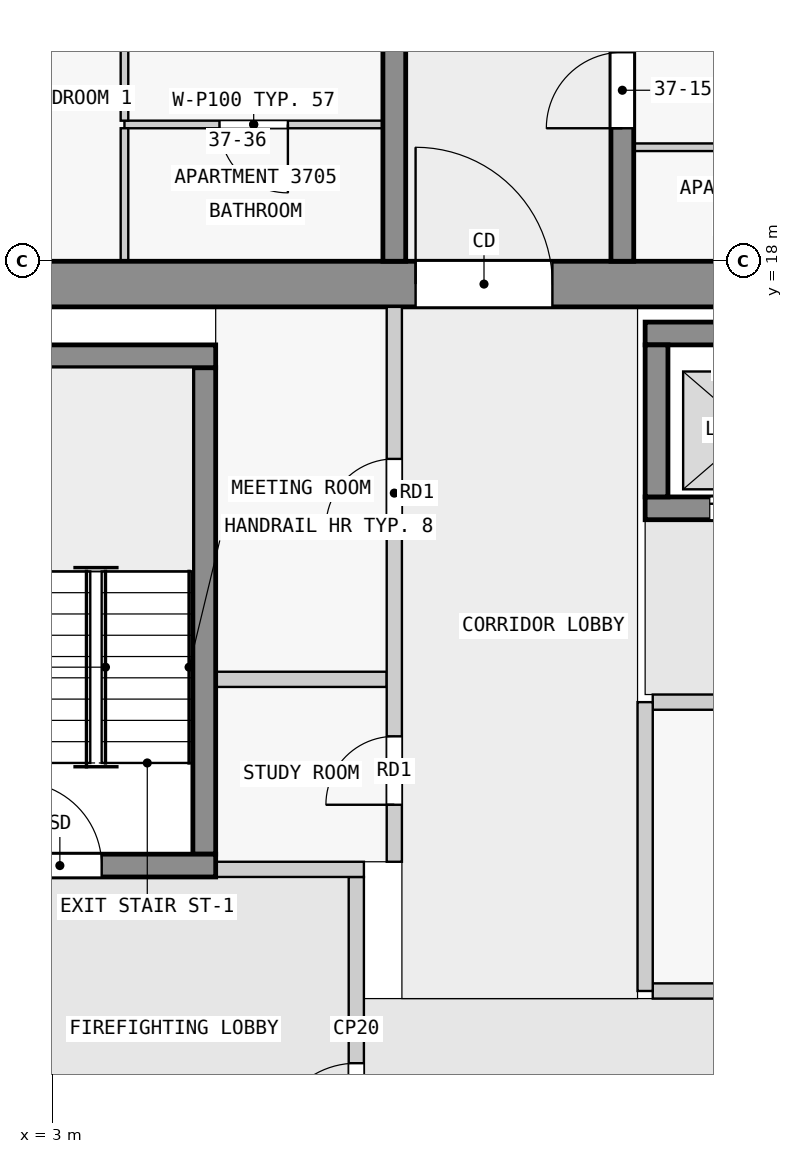
"""IFC4 building model, lengths in metres.
Left out: names, types, materials, properties, quantities, classifications, styles, units other than length and angle.
Written with IfcOpenShell. Run it as: python <this file> out.ifc"""

import sys

from ifc_helpers import new_model, si_unit, direction, frame, frame_2d, origin, place, context, subcontext, project, spatial, rectangle, extrude, element, fill, save


model = new_model("IFC4")
c1 = context("Model", 3, precision=1e-05, world=origin(), true_north=direction((0.0, 1.0)))
c2 = subcontext(c1, "Body", "Model", "MODEL_VIEW")
j1 = project(units=[si_unit("LENGTHUNIT", "METRE"), si_unit("PLANEANGLEUNIT", "RADIAN")], contexts=[c1])
p1 = place(None, origin())
s1 = spatial("IfcSite", under=j1, at=p1, CompositionType="ELEMENT")
p2 = place(p1, origin())
s2 = spatial("IfcBuilding", under=s1, at=p2, CompositionType="ELEMENT")
p3 = place(p2, frame((0.0, 0.0, 146.4)))
s3 = spatial("IfcBuildingStorey", under=s2, at=p3, CompositionType="ELEMENT", Elevation=146.4)
p4 = place(p3, frame((1.38, 17.7, 0.0), z_axis=(0.0, 0.0, 1.0), x_axis=(1.0, 0.0, 0.0)))
e1 = element("IfcWall", 1, at=p4, inside=s3, PredefinedType="SHEAR", context=c2, shape_type="SweptSolid", body=[
    extrude(rectangle(XDim=21.12, YDim=0.6, at=frame_2d((10.56, 0.0))), origin(), (0.0, 0.0, 1.0), 3.25),
])
p5 = place(p4, frame((6.4, 0.0, 0.0)))
e2 = element("IfcOpeningElement", 2, at=p5, cuts=e1, PredefinedType="OPENING", context=c2, shape_type="SweptSolid", body=[
    extrude(rectangle(XDim=1.8, YDim=2.1, at=frame_2d((0.9, 1.05))), frame((0.0, 0.31, 0.0), z_axis=(0.0, -1.0, 0.0), x_axis=(1.0, 0.0, 0.0)), (0.0, 0.0, 1.0), 0.62),
])
p6 = place(p3, frame((2.3, 10.05, 0.0), z_axis=(0.0, 0.0, 1.0), x_axis=(1.0, 0.0, 0.0)))
e3 = element("IfcWall", 3, at=p6, inside=s3, PredefinedType="SHEAR", context=c2, shape_type="SweptSolid", body=[
    extrude(rectangle(XDim=2.85, YDim=0.3, at=frame_2d((1.425, 0.0))), origin(), (0.0, 0.0, 1.0), 3.25),
])
p7 = place(p6, frame((0.25, 0.0, 0.0)))
e4 = element("IfcOpeningElement", 4, at=p7, cuts=e3, PredefinedType="OPENING", context=c2, shape_type="SweptSolid", body=[
    extrude(rectangle(XDim=1.1, YDim=2.1, at=frame_2d((0.55, 1.05))), frame((0.0, 0.16, 0.0), z_axis=(0.0, -1.0, 0.0), x_axis=(1.0, 0.0, 0.0)), (0.0, 0.0, 1.0), 0.32),
])
p8 = place(p3, frame((5.0, 10.2, 0.0), z_axis=(0.0, 0.0, 1.0), x_axis=(0.0, 1.0, 0.0)))
e5 = element("IfcWall", 5, at=p8, inside=s3, PredefinedType="SHEAR", context=c2, shape_type="SweptSolid", body=[
    extrude(rectangle(XDim=6.4, YDim=0.3, at=frame_2d((3.2, 0.0))), origin(), (0.0, 0.0, 1.0), 3.25),
])
p9 = place(p3, frame((2.3, 16.75, 0.0), z_axis=(0.0, 0.0, 1.0), x_axis=(1.0, 0.0, 0.0)))
e6 = element("IfcWall", 6, at=p9, inside=s3, PredefinedType="SHEAR", context=c2, shape_type="SweptSolid", body=[
    extrude(rectangle(XDim=2.85, YDim=0.3, at=frame_2d((1.425, 0.0))), origin(), (0.0, 0.0, 1.0), 3.25),
])
p10 = place(p3, frame((10.8, 17.05, 0.0), z_axis=(0.0, 0.0, 1.0), x_axis=(1.0, 0.0, 0.0)))
e7 = element("IfcWall", 7, at=p10, inside=s3, PredefinedType="SHEAR", context=c2, shape_type="SweptSolid", body=[
    extrude(rectangle(XDim=7.8, YDim=0.3, at=frame_2d((3.9, 0.0))), origin(), (0.0, 0.0, 1.0), 3.25),
])
p11 = place(p3, frame((10.8, 14.75, 0.0), z_axis=(0.0, 0.0, 1.0), x_axis=(1.0, 0.0, 0.0)))
e8 = element("IfcWall", 8, at=p11, inside=s3, PredefinedType="SHEAR", context=c2, shape_type="SweptSolid", body=[
    extrude(rectangle(XDim=7.8, YDim=0.3, at=frame_2d((3.9, 0.0))), origin(), (0.0, 0.0, 1.0), 3.25),
])
p12 = place(p11, frame((0.85, 0.0, 0.0)))
e9 = element("IfcOpeningElement", 9, at=p12, cuts=e8, PredefinedType="OPENING", context=c2, shape_type="SweptSolid", body=[
    extrude(rectangle(XDim=1.1, YDim=2.1, at=frame_2d((0.55, 1.05))), frame((0.0, 0.16, 0.0), z_axis=(0.0, -1.0, 0.0), x_axis=(1.0, 0.0, 0.0)), (0.0, 0.0, 1.0), 0.32),
])
p13 = place(p11, frame((3.35, 0.0, 0.0)))
e10 = element("IfcOpeningElement", 10, at=p13, cuts=e8, PredefinedType="OPENING", context=c2, shape_type="SweptSolid", body=[
    extrude(rectangle(XDim=1.1, YDim=2.1, at=frame_2d((0.55, 1.05))), frame((0.0, 0.16, 0.0), z_axis=(0.0, -1.0, 0.0), x_axis=(1.0, 0.0, 0.0)), (0.0, 0.0, 1.0), 0.32),
])
p14 = place(p11, frame((5.85, 0.0, 0.0)))
e11 = element("IfcOpeningElement", 11, at=p14, cuts=e8, PredefinedType="OPENING", context=c2, shape_type="SweptSolid", body=[
    extrude(rectangle(XDim=1.1, YDim=2.1, at=frame_2d((0.55, 1.05))), frame((0.0, 0.16, 0.0), z_axis=(0.0, -1.0, 0.0), x_axis=(1.0, 0.0, 0.0)), (0.0, 0.0, 1.0), 0.32),
])
p15 = place(p3, frame((10.95, 14.9, 0.0), z_axis=(0.0, 0.0, 1.0), x_axis=(0.0, 1.0, 0.0)))
e12 = element("IfcWall", 12, at=p15, inside=s3, PredefinedType="SHEAR", context=c2, shape_type="SweptSolid", body=[
    extrude(rectangle(XDim=2.0, YDim=0.3, at=frame_2d((1.0, 0.0))), origin(), (0.0, 0.0, 1.0), 3.25),
])
p16 = place(p3, frame((7.5, 18.0, 0.0), z_axis=(0.0, 0.0, 1.0), x_axis=(0.0, 1.0, 0.0)))
e13 = element("IfcWall", 13, at=p16, inside=s3, PredefinedType="SHEAR", context=c2, shape_type="SweptSolid", body=[
    extrude(rectangle(XDim=27.0, YDim=0.3, at=frame_2d((13.5, 0.0))), origin(), (0.0, 0.0, 1.0), 3.25),
])
p17 = place(p16, frame((4.05, 0.0, 0.0)))
e14 = element("IfcOpeningElement", 14, at=p17, cuts=e13, PredefinedType="OPENING", context=c2, shape_type="SweptSolid", body=[
    extrude(rectangle(XDim=1.0, YDim=2.1, at=frame_2d((0.5, 1.05))), frame((0.0, 0.16, 0.0), z_axis=(0.0, -1.0, 0.0), x_axis=(1.0, 0.0, 0.0)), (0.0, 0.0, 1.0), 0.32),
])
p18 = place(p16, frame((10.75, 0.0, 0.0)))
e15 = element("IfcOpeningElement", 15, at=p18, cuts=e13, PredefinedType="OPENING", context=c2, shape_type="SweptSolid", body=[
    extrude(rectangle(XDim=1.0, YDim=2.1, at=frame_2d((0.5, 1.05))), frame((0.0, 0.16, 0.0), z_axis=(0.0, -1.0, 0.0), x_axis=(1.0, 0.0, 0.0)), (0.0, 0.0, 1.0), 0.32),
])
p19 = place(p16, frame((17.55, 0.0, 0.0)))
e16 = element("IfcOpeningElement", 16, at=p19, cuts=e13, PredefinedType="OPENING", context=c2, shape_type="SweptSolid", body=[
    extrude(rectangle(XDim=1.0, YDim=2.1, at=frame_2d((0.5, 1.05))), frame((0.0, 0.16, 0.0), z_axis=(0.0, -1.0, 0.0), x_axis=(1.0, 0.0, 0.0)), (0.0, 0.0, 1.0), 0.32),
])
p20 = place(p16, frame((23.25, 0.0, 0.0)))
e17 = element("IfcOpeningElement", 17, at=p20, cuts=e13, PredefinedType="OPENING", context=c2, shape_type="SweptSolid", body=[
    extrude(rectangle(XDim=0.9, YDim=2.1, at=frame_2d((0.45, 1.05))), frame((0.0, 0.16, 0.0), z_axis=(0.0, -1.0, 0.0), x_axis=(1.0, 0.0, 0.0)), (0.0, 0.0, 1.0), 0.32),
])
p21 = place(p16, frame((25.45, 0.0, 0.0)))
e18 = element("IfcOpeningElement", 18, at=p21, cuts=e13, PredefinedType="OPENING", context=c2, shape_type="SweptSolid", body=[
    extrude(rectangle(XDim=1.0, YDim=2.1, at=frame_2d((0.5, 1.05))), frame((0.0, 0.16, 0.0), z_axis=(0.0, -1.0, 0.0), x_axis=(1.0, 0.0, 0.0)), (0.0, 0.0, 1.0), 0.32),
])
p22 = place(p3, frame((10.5, 18.0, 0.0), z_axis=(0.0, 0.0, 1.0), x_axis=(0.0, 1.0, 0.0)))
e19 = element("IfcWall", 19, at=p22, inside=s3, PredefinedType="SHEAR", context=c2, shape_type="SweptSolid", body=[
    extrude(rectangle(XDim=27.0, YDim=0.3, at=frame_2d((13.5, 0.0))), origin(), (0.0, 0.0, 1.0), 3.25),
])
p23 = place(p22, frame((1.75, 0.0, 0.0)))
e20 = element("IfcOpeningElement", 20, at=p23, cuts=e19, PredefinedType="OPENING", context=c2, shape_type="SweptSolid", body=[
    extrude(rectangle(XDim=1.0, YDim=2.1, at=frame_2d((0.5, 1.05))), frame((0.0, 0.16, 0.0), z_axis=(0.0, -1.0, 0.0), x_axis=(1.0, 0.0, 0.0)), (0.0, 0.0, 1.0), 0.32),
])
p24 = place(p22, frame((6.25, 0.0, 0.0)))
e21 = element("IfcOpeningElement", 21, at=p24, cuts=e19, PredefinedType="OPENING", context=c2, shape_type="SweptSolid", body=[
    extrude(rectangle(XDim=1.0, YDim=2.1, at=frame_2d((0.5, 1.05))), frame((0.0, 0.16, 0.0), z_axis=(0.0, -1.0, 0.0), x_axis=(1.0, 0.0, 0.0)), (0.0, 0.0, 1.0), 0.32),
])
p25 = place(p22, frame((10.35, 0.0, 0.0)))
e22 = element("IfcOpeningElement", 22, at=p25, cuts=e19, PredefinedType="OPENING", context=c2, shape_type="SweptSolid", body=[
    extrude(rectangle(XDim=1.8, YDim=2.1, at=frame_2d((0.9, 1.05))), frame((0.0, 0.16, 0.0), z_axis=(0.0, -1.0, 0.0), x_axis=(1.0, 0.0, 0.0)), (0.0, 0.0, 1.0), 0.32),
])
p26 = place(p22, frame((15.25, 0.0, 0.0)))
e23 = element("IfcOpeningElement", 23, at=p26, cuts=e19, PredefinedType="OPENING", context=c2, shape_type="SweptSolid", body=[
    extrude(rectangle(XDim=1.0, YDim=2.1, at=frame_2d((0.5, 1.05))), frame((0.0, 0.16, 0.0), z_axis=(0.0, -1.0, 0.0), x_axis=(1.0, 0.0, 0.0)), (0.0, 0.0, 1.0), 0.32),
])
p27 = place(p22, frame((21.35, 0.0, 0.0)))
e24 = element("IfcOpeningElement", 24, at=p27, cuts=e19, PredefinedType="OPENING", context=c2, shape_type="SweptSolid", body=[
    extrude(rectangle(XDim=1.0, YDim=2.1, at=frame_2d((0.5, 1.05))), frame((0.0, 0.16, 0.0), z_axis=(0.0, -1.0, 0.0), x_axis=(1.0, 0.0, 0.0)), (0.0, 0.0, 1.0), 0.32),
])
p28 = place(p3, frame((7.0, 5.9, 0.0), z_axis=(0.0, 0.0, 1.0), x_axis=(0.0, 1.0, 0.0)))
e25 = element("IfcWall", 25, at=p28, inside=s3, PredefinedType="PARTITIONING", context=c2, shape_type="SweptSolid", body=[
    extrude(rectangle(XDim=4.0, YDim=0.2, at=frame_2d((2.0, 0.0))), origin(), (0.0, 0.0, 1.0), 3.25),
])
p29 = place(p28, frame((0.45, 0.0, 0.0)))
e26 = element("IfcOpeningElement", 26, at=p29, cuts=e25, PredefinedType="OPENING", context=c2, shape_type="SweptSolid", body=[
    extrude(rectangle(XDim=1.1, YDim=2.1, at=frame_2d((0.55, 1.05))), frame((0.0, 0.11, 0.0), z_axis=(0.0, -1.0, 0.0), x_axis=(1.0, 0.0, 0.0)), (0.0, 0.0, 1.0), 0.22),
])
p30 = place(p3, frame((5.15, 10.0, 0.0), z_axis=(0.0, 0.0, 1.0), x_axis=(1.0, 0.0, 0.0)))
e27 = element("IfcWall", 27, at=p30, inside=s3, PredefinedType="PARTITIONING", context=c2, shape_type="SweptSolid", body=[
    extrude(rectangle(XDim=1.95, YDim=0.2, at=frame_2d((0.975, 0.0))), origin(), (0.0, 0.0, 1.0), 3.25),
])
p31 = place(p3, frame((10.8, 8.4, 0.0), z_axis=(0.0, 0.0, 1.0), x_axis=(0.0, 1.0, 0.0)))
e28 = element("IfcWall", 28, at=p31, inside=s3, PredefinedType="PARTITIONING", context=c2, shape_type="SweptSolid", body=[
    extrude(rectangle(XDim=3.8, YDim=0.2, at=frame_2d((1.9, 0.0))), origin(), (0.0, 0.0, 1.0), 3.25),
])
p32 = place(p3, frame((10.9, 8.4, 0.0), z_axis=(0.0, 0.0, 1.0), x_axis=(1.0, 0.0, 0.0)))
e29 = element("IfcWall", 29, at=p32, inside=s3, PredefinedType="PARTITIONING", context=c2, shape_type="SweptSolid", body=[
    extrude(rectangle(XDim=8.5, YDim=0.2, at=frame_2d((4.25, 0.0))), origin(), (0.0, 0.0, 1.0), 3.25),
])
p33 = place(p3, frame((10.9, 12.2, 0.0), z_axis=(0.0, 0.0, 1.0), x_axis=(1.0, 0.0, 0.0)))
e30 = element("IfcWall", 30, at=p33, inside=s3, PredefinedType="PARTITIONING", context=c2, shape_type="SweptSolid", body=[
    extrude(rectangle(XDim=8.5, YDim=0.2, at=frame_2d((4.25, 0.0))), origin(), (0.0, 0.0, 1.0), 3.25),
])
p34 = place(p33, frame((3.8, 0.0, 0.0)))
e31 = element("IfcOpeningElement", 31, at=p34, cuts=e30, PredefinedType="OPENING", context=c2, shape_type="SweptSolid", body=[
    extrude(rectangle(XDim=0.9, YDim=2.1, at=frame_2d((0.45, 1.05))), frame((0.0, 0.11, 0.0), z_axis=(0.0, -1.0, 0.0), x_axis=(1.0, 0.0, 0.0)), (0.0, 0.0, 1.0), 0.22),
])
p35 = place(p3, frame((7.5, 10.1, 0.0), z_axis=(0.0, 0.0, 1.0), x_axis=(0.0, 1.0, 0.0)))
e32 = element("IfcWall", 32, at=p35, inside=s3, PredefinedType="PARTITIONING", context=c2, shape_type="SweptSolid", body=[
    extrude(rectangle(XDim=7.3, YDim=0.2, at=frame_2d((3.65, 0.0))), origin(), (0.0, 0.0, 1.0), 3.25),
])
p36 = place(p35, frame((0.75, 0.0, 0.0)))
e33 = element("IfcOpeningElement", 33, at=p36, cuts=e32, PredefinedType="OPENING", context=c2, shape_type="SweptSolid", body=[
    extrude(rectangle(XDim=0.9, YDim=2.1, at=frame_2d((0.45, 1.05))), frame((0.0, 0.11, 0.0), z_axis=(0.0, -1.0, 0.0), x_axis=(1.0, 0.0, 0.0)), (0.0, 0.0, 1.0), 0.22),
])
p37 = place(p35, frame((4.4, 0.0, 0.0)))
e34 = element("IfcOpeningElement", 34, at=p37, cuts=e32, PredefinedType="OPENING", context=c2, shape_type="SweptSolid", body=[
    extrude(rectangle(XDim=0.9, YDim=2.1, at=frame_2d((0.45, 1.05))), frame((0.0, 0.11, 0.0), z_axis=(0.0, -1.0, 0.0), x_axis=(1.0, 0.0, 0.0)), (0.0, 0.0, 1.0), 0.22),
])
p38 = place(p3, frame((5.15, 12.5, 0.0), z_axis=(0.0, 0.0, 1.0), x_axis=(1.0, 0.0, 0.0)))
e35 = element("IfcWall", 35, at=p38, inside=s3, PredefinedType="PARTITIONING", context=c2, shape_type="SweptSolid", body=[
    extrude(rectangle(XDim=2.25, YDim=0.2, at=frame_2d((1.125, 0.0))), origin(), (0.0, 0.0, 1.0), 3.25),
])
p39 = place(p3, frame((14.05, 19.5, 0.0), z_axis=(0.0, 0.0, 1.0), x_axis=(-1.0, 0.0, 0.0)))
e36 = element("IfcWall", 36, at=p39, inside=s3, PredefinedType="PARTITIONING", context=c2, shape_type="SweptSolid", body=[
    extrude(rectangle(XDim=3.4, YDim=0.1, at=frame_2d((1.7, 0.0))), origin(), (0.0, 0.0, 1.0), 3.25),
])
p40 = place(p39, frame((1.25, 0.0, 0.0)))
e37 = element("IfcOpeningElement", 37, at=p40, cuts=e36, PredefinedType="OPENING", context=c2, shape_type="SweptSolid", body=[
    extrude(rectangle(XDim=0.9, YDim=2.1, at=frame_2d((0.45, 1.05))), frame((0.0, 0.06, 0.0), z_axis=(0.0, -1.0, 0.0), x_axis=(1.0, 0.0, 0.0)), (0.0, 0.0, 1.0), 0.12),
])
p41 = place(p3, frame((7.35, 19.8, 0.0), z_axis=(0.0, 0.0, 1.0), x_axis=(-1.0, 0.0, 0.0)))
e38 = element("IfcWall", 38, at=p41, inside=s3, PredefinedType="PARTITIONING", context=c2, shape_type="SweptSolid", body=[
    extrude(rectangle(XDim=3.4, YDim=0.1, at=frame_2d((1.7, 0.0))), origin(), (0.0, 0.0, 1.0), 3.25),
])
p42 = place(p41, frame((1.25, 0.0, 0.0)))
e39 = element("IfcOpeningElement", 39, at=p42, cuts=e38, PredefinedType="OPENING", context=c2, shape_type="SweptSolid", body=[
    extrude(rectangle(XDim=0.9, YDim=2.1, at=frame_2d((0.45, 1.05))), frame((0.0, 0.06, 0.0), z_axis=(0.0, -1.0, 0.0), x_axis=(1.0, 0.0, 0.0)), (0.0, 0.0, 1.0), 0.12),
])
p43 = place(p3, frame((3.95, 19.75, 0.0), z_axis=(0.0, 0.0, 1.0), x_axis=(0.0, -1.0, 0.0)))
e40 = element("IfcWall", 40, at=p43, inside=s3, PredefinedType="PARTITIONING", context=c2, shape_type="SweptSolid", body=[
    extrude(rectangle(XDim=1.75, YDim=0.1, at=frame_2d((0.875, 0.0))), origin(), (0.0, 0.0, 1.0), 3.25),
])
p44 = place(p3, frame((3.95, 19.85, 0.0), z_axis=(0.0, 0.0, 1.0), x_axis=(0.0, 1.0, 0.0)))
e41 = element("IfcWall", 41, at=p44, inside=s3, PredefinedType="PARTITIONING", context=c2, shape_type="SweptSolid", body=[
    extrude(rectangle(XDim=2.6, YDim=0.1, at=frame_2d((1.3, 0.0))), origin(), (0.0, 0.0, 1.0), 3.25),
])
p45 = place(p29, origin())
e42 = element("IfcDoor", 42, at=p45, inside=s3, OperationType="SINGLE_SWING_LEFT", PredefinedType="DOOR", context=c2, shape_type="SweptSolid", body=[
    extrude(rectangle(XDim=1.1, YDim=2.1, at=frame_2d((0.55, 1.05))), frame((0.0, 0.025, 0.0), z_axis=(0.0, -1.0, 0.0), x_axis=(1.0, 0.0, 0.0)), (0.0, 0.0, 1.0), 0.05),
])
fill(e26, e42)
p46 = place(p7, origin())
e43 = element("IfcDoor", 43, at=p46, inside=s3, OperationType="SINGLE_SWING_RIGHT", PredefinedType="DOOR", context=c2, shape_type="SweptSolid", body=[
    extrude(rectangle(XDim=1.1, YDim=2.1, at=frame_2d((0.55, 1.05))), frame((0.0, 0.025, 0.0), z_axis=(0.0, -1.0, 0.0), x_axis=(1.0, 0.0, 0.0)), (0.0, 0.0, 1.0), 0.05),
])
fill(e4, e43)
p47 = place(p12, origin())
e44 = element("IfcDoor", 44, at=p47, inside=s3, OperationType="DOUBLE_DOOR_SLIDING", PredefinedType="DOOR", context=c2, shape_type="SweptSolid", body=[
    extrude(rectangle(XDim=1.1, YDim=2.1, at=frame_2d((0.55, 1.05))), frame((0.0, 0.025, 0.0), z_axis=(0.0, -1.0, 0.0), x_axis=(1.0, 0.0, 0.0)), (0.0, 0.0, 1.0), 0.05),
])
fill(e9, e44)
p48 = place(p5, origin())
e45 = element("IfcDoor", 45, at=p48, inside=s3, OperationType="DOUBLE_DOOR_SINGLE_SWING", PredefinedType="DOOR", context=c2, shape_type="SweptSolid", body=[
    extrude(rectangle(XDim=1.8, YDim=2.1, at=frame_2d((0.9, 1.05))), frame((0.0, 0.025, 0.0), z_axis=(0.0, -1.0, 0.0), x_axis=(1.0, 0.0, 0.0)), (0.0, 0.0, 1.0), 0.05),
])
fill(e2, e45)
p49 = place(p36, origin())
e46 = element("IfcDoor", 46, at=p49, inside=s3, OperationType="SINGLE_SWING_RIGHT", PredefinedType="DOOR", context=c2, shape_type="SweptSolid", body=[
    extrude(rectangle(XDim=0.9, YDim=2.1, at=frame_2d((0.45, 1.05))), frame((0.0, 0.025, 0.0), z_axis=(0.0, -1.0, 0.0), x_axis=(1.0, 0.0, 0.0)), (0.0, 0.0, 1.0), 0.05),
])
fill(e33, e46)
p50 = place(p37, origin())
e47 = element("IfcDoor", 47, at=p50, inside=s3, OperationType="SINGLE_SWING_RIGHT", PredefinedType="DOOR", context=c2, shape_type="SweptSolid", body=[
    extrude(rectangle(XDim=0.9, YDim=2.1, at=frame_2d((0.45, 1.05))), frame((0.0, 0.025, 0.0), z_axis=(0.0, -1.0, 0.0), x_axis=(1.0, 0.0, 0.0)), (0.0, 0.0, 1.0), 0.05),
])
fill(e34, e47)
p51 = place(p23, origin())
e48 = element("IfcDoor", 48, at=p51, inside=s3, OperationType="SINGLE_SWING_LEFT", PredefinedType="DOOR", context=c2, shape_type="SweptSolid", body=[
    extrude(rectangle(XDim=1.0, YDim=2.1, at=frame_2d((0.5, 1.05))), frame((0.0, 0.025, 0.0), z_axis=(0.0, -1.0, 0.0), x_axis=(1.0, 0.0, 0.0)), (0.0, 0.0, 1.0), 0.05),
])
fill(e20, e48)
p52 = place(p42, origin())
e49 = element("IfcDoor", 49, at=p52, inside=s3, OperationType="SINGLE_SWING_RIGHT", PredefinedType="DOOR", context=c2, shape_type="SweptSolid", body=[
    extrude(rectangle(XDim=0.9, YDim=2.1, at=frame_2d((0.45, 1.05))), frame((0.0, 0.025, 0.0), z_axis=(0.0, -1.0, 0.0), x_axis=(1.0, 0.0, 0.0)), (0.0, 0.0, 1.0), 0.05),
])
fill(e39, e49)
save(model, sys.argv[1])
